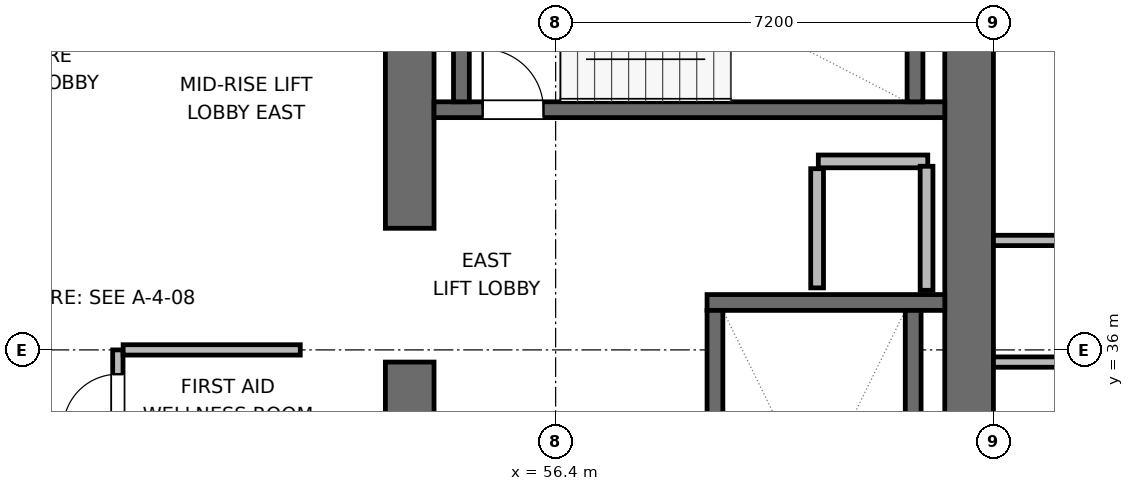
"""IFC4 building model, lengths in metres.
Left out: names, types, materials, properties, quantities, classifications, styles, units other than length and angle.
Written with IfcOpenShell. Run it as: python <this file> out.ifc"""

import sys

from ifc_helpers import new_model, si_unit, direction, frame, frame_2d, origin, place, context, subcontext, project, spatial, rectangle, extrude, element, fill, save


model = new_model("IFC4")
c1 = context("Model", 3, precision=1e-05, world=origin(), true_north=direction((0.0, 1.0)))
c2 = subcontext(c1, "Body", "Model", "MODEL_VIEW")
j1 = project(units=[si_unit("LENGTHUNIT", "METRE"), si_unit("PLANEANGLEUNIT", "RADIAN")], contexts=[c1])
p1 = place(None, origin())
s1 = spatial("IfcSite", under=j1, at=p1, CompositionType="ELEMENT")
p2 = place(p1, origin())
s2 = spatial("IfcBuilding", under=s1, at=p2, CompositionType="ELEMENT")
p3 = place(p2, frame((0.0, 0.0, 177.9)))
s3 = spatial("IfcBuildingStorey", under=s2, at=p3, CompositionType="ELEMENT", Elevation=177.9)
p4 = place(p3, frame((54.0, 28.0, 0.0), z_axis=(0.0, 0.0, 1.0), x_axis=(0.0, 1.0, 0.0)))
e1 = element("IfcWall", 1, at=p4, inside=s3, PredefinedType="SHEAR", context=c2, shape_type="SweptSolid", body=[
    extrude(rectangle(XDim=7.8, YDim=0.8, at=frame_2d((3.9, 0.0))), origin(), (0.0, 0.0, 1.0), 3.9),
])
p5 = place(p3, frame((54.0, 38.0, 0.0), z_axis=(0.0, 0.0, 1.0), x_axis=(0.0, 1.0, 0.0)))
e2 = element("IfcWall", 2, at=p5, inside=s3, PredefinedType="SHEAR", context=c2, shape_type="SweptSolid", body=[
    extrude(rectangle(XDim=6.0, YDim=0.8, at=frame_2d((3.0, 0.0))), origin(), (0.0, 0.0, 1.0), 3.9),
])
p6 = place(p3, frame((63.2, 27.6, 0.0), z_axis=(0.0, 0.0, 1.0), x_axis=(0.0, 1.0, 0.0)))
e3 = element("IfcWall", 3, at=p6, inside=s3, PredefinedType="SHEAR", context=c2, shape_type="SweptSolid", body=[
    extrude(rectangle(XDim=16.8, YDim=0.8, at=frame_2d((8.4, 0.0))), origin(), (0.0, 0.0, 1.0), 3.9),
])
p7 = place(p3, frame((58.89, 36.78, 0.0), z_axis=(0.0, 0.0, 1.0), x_axis=(1.0, 0.0, 0.0)))
e4 = element("IfcWall", 4, at=p7, inside=s3, PredefinedType="SHEAR", context=c2, shape_type="SweptSolid", body=[
    extrude(rectangle(XDim=3.91, YDim=0.26, at=frame_2d((1.955, 0.0))), origin(), (0.0, 0.0, 1.0), 3.9),
])
p8 = place(p3, frame((59.02, 29.05, 0.0), z_axis=(0.0, 0.0, 1.0), x_axis=(0.0, 1.0, 0.0)))
e5 = element("IfcWall", 5, at=p8, inside=s3, PredefinedType="SHEAR", context=c2, shape_type="SweptSolid", body=[
    extrude(rectangle(XDim=7.6, YDim=0.26, at=frame_2d((3.8, 0.0))), origin(), (0.0, 0.0, 1.0), 3.9),
])
p9 = place(p8, frame((0.3, 0.0, 0.0)))
e6 = element("IfcOpeningElement", 6, at=p9, cuts=e5, PredefinedType="OPENING", context=c2, shape_type="SweptSolid", body=[
    extrude(rectangle(XDim=1.0, YDim=2.04, at=frame_2d((0.5, 1.02))), frame((0.0, 0.14, 0.0), z_axis=(0.0, -1.0, 0.0), x_axis=(1.0, 0.0, 0.0)), (0.0, 0.0, 1.0), 0.28),
])
p10 = place(p3, frame((62.28, 29.05, 0.0), z_axis=(0.0, 0.0, 1.0), x_axis=(0.0, 1.0, 0.0)))
e7 = element("IfcWall", 7, at=p10, inside=s3, PredefinedType="SHEAR", context=c2, shape_type="SweptSolid", body=[
    extrude(rectangle(XDim=7.6, YDim=0.26, at=frame_2d((3.8, 0.0))), origin(), (0.0, 0.0, 1.0), 3.9),
])
p11 = place(p3, frame((54.4, 39.95, 0.0), z_axis=(0.0, 0.0, 1.0), x_axis=(1.0, 0.0, 0.0)))
e8 = element("IfcWall", 8, at=p11, inside=s3, PredefinedType="SHEAR", context=c2, shape_type="SweptSolid", body=[
    extrude(rectangle(XDim=8.4, YDim=0.26, at=frame_2d((4.2, 0.0))), origin(), (0.0, 0.0, 1.0), 3.9),
])
p12 = place(p11, frame((0.8, 0.0, 0.0)))
e9 = element("IfcOpeningElement", 9, at=p12, cuts=e8, PredefinedType="OPENING", context=c2, shape_type="SweptSolid", body=[
    extrude(rectangle(XDim=1.0, YDim=2.04, at=frame_2d((0.5, 1.02))), frame((0.0, 0.14, 0.0), z_axis=(0.0, -1.0, 0.0), x_axis=(1.0, 0.0, 0.0)), (0.0, 0.0, 1.0), 0.28),
])
for number, where, z_axis, x_axis in (
    (10, (54.85, 40.08, 0.0), (0.0, 0.0, 1.0), (0.0, 1.0, 0.0)),
    (11, (62.31, 40.08, 0.0), (0.0, 0.0, 1.0), (0.0, 1.0, 0.0)),
):
    element("IfcWall", number, at=place(p3, frame(where, z_axis=z_axis, x_axis=x_axis)), inside=s3, PredefinedType="SHEAR", context=c2, shape_type="SweptSolid", body=[
        extrude(rectangle(XDim=2.94, YDim=0.26, at=frame_2d((1.47, 0.0))), origin(), (0.0, 0.0, 1.0), 3.9),
    ])
p13 = place(p3, frame((60.72, 39.1, 0.0), z_axis=(0.0, 0.0, 1.0), x_axis=(1.0, 0.0, 0.0)))
e12 = element("IfcWall", 12, at=p13, inside=s3, PredefinedType="PARTITIONING", context=c2, shape_type="SweptSolid", body=[
    extrude(rectangle(XDim=1.8, YDim=0.21, at=frame_2d((0.9, 0.0))), origin(), (0.0, 0.0, 1.0), 3.68),
])
p14 = place(p3, frame((60.7, 37.02, 0.0), z_axis=(0.0, 0.0, 1.0), x_axis=(0.0, 1.0, 0.0)))
e13 = element("IfcWall", 13, at=p14, inside=s3, PredefinedType="PARTITIONING", context=c2, shape_type="SweptSolid", body=[
    extrude(rectangle(XDim=1.96, YDim=0.21, at=frame_2d((0.98, 0.0))), origin(), (0.0, 0.0, 1.0), 3.68),
])
p15 = place(p3, frame((62.5, 36.98, 0.0), z_axis=(0.0, 0.0, 1.0), x_axis=(0.0, 1.0, 0.0)))
e14 = element("IfcWall", 14, at=p15, inside=s3, PredefinedType="PARTITIONING", context=c2, shape_type="SweptSolid", body=[
    extrude(rectangle(XDim=2.04, YDim=0.21, at=frame_2d((1.02, 0.0))), origin(), (0.0, 0.0, 1.0), 3.68),
])
p16 = place(p3, frame((49.2, 32.6, 0.0), z_axis=(0.0, 0.0, 1.0), x_axis=(0.0, 1.0, 0.0)))
e15 = element("IfcWall", 15, at=p16, inside=s3, PredefinedType="PARTITIONING", context=c2, shape_type="SweptSolid", body=[
    extrude(rectangle(XDim=3.4, YDim=0.17, at=frame_2d((1.7, 0.0))), origin(), (0.0, 0.0, 1.0), 3.68),
])
p17 = place(p16, frame((0.4, 0.0, 0.0)))
e16 = element("IfcOpeningElement", 16, at=p17, cuts=e15, PredefinedType="OPENING", context=c2, shape_type="SweptSolid", body=[
    extrude(rectangle(XDim=0.9, YDim=2.02, at=frame_2d((0.45, 1.01))), frame((0.0, 0.095, 0.0), z_axis=(0.0, -1.0, 0.0), x_axis=(1.0, 0.0, 0.0)), (0.0, 0.0, 1.0), 0.19),
])
p18 = place(p16, frame((2.1, 0.0, 0.0)))
e17 = element("IfcOpeningElement", 17, at=p18, cuts=e15, PredefinedType="OPENING", context=c2, shape_type="SweptSolid", body=[
    extrude(rectangle(XDim=0.9, YDim=2.02, at=frame_2d((0.45, 1.01))), frame((0.0, 0.095, 0.0), z_axis=(0.0, -1.0, 0.0), x_axis=(1.0, 0.0, 0.0)), (0.0, 0.0, 1.0), 0.19),
])
p19 = place(p3, frame((49.287, 36.0, 0.0), z_axis=(0.0, 0.0, 1.0), x_axis=(1.0, 0.0, 0.0)))
e18 = element("IfcWall", 18, at=p19, inside=s3, PredefinedType="PARTITIONING", context=c2, shape_type="SweptSolid", body=[
    extrude(rectangle(XDim=2.913, YDim=0.17, at=frame_2d((1.457, 0.0))), origin(), (0.0, 0.0, 1.0), 3.68),
])
p20 = place(p3, frame((63.6, 35.8, 0.0), z_axis=(0.0, 0.0, 1.0), x_axis=(1.0, 0.0, 0.0)))
e19 = element("IfcWall", 19, at=p20, inside=s3, PredefinedType="PARTITIONING", context=c2, shape_type="SweptSolid", body=[
    extrude(rectangle(XDim=6.975, YDim=0.17, at=frame_2d((3.487, 0.0))), origin(), (0.0, 0.0, 1.0), 3.043),
])
p21 = place(p20, frame((1.1, 0.0, 0.0)))
e20 = element("IfcOpeningElement", 20, at=p21, cuts=e19, PredefinedType="OPENING", context=c2, shape_type="SweptSolid", body=[
    extrude(rectangle(XDim=0.95, YDim=2.04, at=frame_2d((0.475, 1.02))), frame((0.0, 0.095, 0.0), z_axis=(0.0, -1.0, 0.0), x_axis=(1.0, 0.0, 0.0)), (0.0, 0.0, 1.0), 0.19),
])
p22 = place(p3, frame((63.6, 37.8, 0.0), z_axis=(0.0, 0.0, 1.0), x_axis=(1.0, 0.0, 0.0)))
e21 = element("IfcWall", 21, at=p22, inside=s3, PredefinedType="PARTITIONING", context=c2, shape_type="SweptSolid", body=[
    extrude(rectangle(XDim=4.96, YDim=0.17, at=frame_2d((2.48, 0.0))), origin(), (0.0, 0.0, 1.0), 3.68),
])
p23 = place(p22, frame((1.1, 0.0, 0.0)))
e22 = element("IfcOpeningElement", 22, at=p23, cuts=e21, PredefinedType="OPENING", context=c2, shape_type="SweptSolid", body=[
    extrude(rectangle(XDim=0.95, YDim=2.04, at=frame_2d((0.475, 1.02))), frame((0.0, 0.095, 0.0), z_axis=(0.0, -1.0, 0.0), x_axis=(1.0, 0.0, 0.0)), (0.0, 0.0, 1.0), 0.19),
])
p24 = place(p12, origin())
e23 = element("IfcDoor", 23, at=p24, inside=s3, OperationType="SINGLE_SWING_LEFT", PredefinedType="DOOR", context=c2, shape_type="SweptSolid", body=[
    extrude(rectangle(XDim=1.0, YDim=2.04, at=frame_2d((0.5, 1.02))), frame((0.0, 0.025, 0.0), z_axis=(0.0, -1.0, 0.0), x_axis=(1.0, 0.0, 0.0)), (0.0, 0.0, 1.0), 0.05),
])
fill(e9, e23)
p25 = place(p18, origin())
e24 = element("IfcDoor", 24, at=p25, inside=s3, OperationType="SINGLE_SWING_LEFT", PredefinedType="DOOR", context=c2, shape_type="SweptSolid", body=[
    extrude(rectangle(XDim=0.9, YDim=2.02, at=frame_2d((0.45, 1.01))), frame((0.0, 0.025, 0.0), z_axis=(0.0, -1.0, 0.0), x_axis=(1.0, 0.0, 0.0)), (0.0, 0.0, 1.0), 0.05),
])
fill(e17, e24)
save(model, sys.argv[1])
